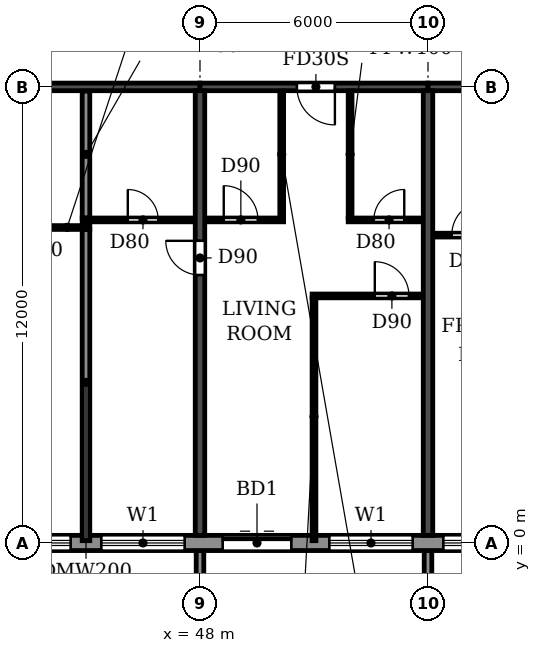
"""IFC4 building model, lengths in metres.
Left out: names, types, materials, properties, quantities, classifications, styles, units other than length and angle.
Written with IfcOpenShell. Run it as: python <this file> out.ifc"""

import sys

from ifc_helpers import new_model, si_unit, direction, frame, frame_2d, origin, place, context, subcontext, project, spatial, polyline, rectangle, outline, extrude, source, transform, mapped, element, fill, save


model = new_model("IFC4")
c1 = context("Model", 3, precision=1e-05, world=origin(), true_north=direction((0.0, 1.0)))
c2 = subcontext(c1, "Body", "Model", "MODEL_VIEW")
j1 = project(units=[si_unit("LENGTHUNIT", "METRE"), si_unit("PLANEANGLEUNIT", "RADIAN")], contexts=[c1])
p1 = place(None, origin())
s1 = spatial("IfcSite", under=j1, at=p1, CompositionType="ELEMENT")
p2 = place(p1, origin())
s2 = spatial("IfcBuilding", under=s1, at=p2, CompositionType="ELEMENT")
p3 = place(p2, frame((0.0, 0.0, 191.7)))
s3 = spatial("IfcBuildingStorey", under=s2, at=p3, CompositionType="ELEMENT", Elevation=191.7)
p4 = place(p3, frame((48.0, 0.2, 0.0), z_axis=(0.0, 0.0, 1.0), x_axis=(0.0, 1.0, 0.0)))
e1 = element("IfcWall", 1, at=p4, inside=s3, PredefinedType="SHEAR", context=c2, shape_type="SweptSolid", body=[
    extrude(rectangle(XDim=11.7, YDim=0.25, at=frame_2d((5.85, 0.0))), origin(), (0.0, 0.0, 1.0), 3.08),
])
p5 = place(p4, frame((6.85, 0.0, 0.0)))
e2 = element("IfcOpeningElement", 2, at=p5, cuts=e1, PredefinedType="OPENING", context=c2, shape_type="SweptSolid", body=[
    extrude(rectangle(XDim=0.9, YDim=2.1, at=frame_2d((0.45, 1.05))), frame((0.0, 0.135, 0.0), z_axis=(0.0, -1.0, 0.0), x_axis=(1.0, 0.0, 0.0)), (0.0, 0.0, 1.0), 0.27),
])
p6 = place(p3, frame((54.0, 0.2, 0.0), z_axis=(0.0, 0.0, 1.0), x_axis=(0.0, 1.0, 0.0)))
e3 = element("IfcWall", 3, at=p6, inside=s3, PredefinedType="SHEAR", context=c2, shape_type="SweptSolid", body=[
    extrude(rectangle(XDim=11.7, YDim=0.25, at=frame_2d((5.85, 0.0))), origin(), (0.0, 0.0, 1.0), 3.08),
])
p7 = place(p3, frame((42.0, 12.0, 0.0), z_axis=(0.0, 0.0, 1.0), x_axis=(1.0, 0.0, 0.0)))
e4 = element("IfcWall", 4, at=p7, inside=s3, PredefinedType="SHEAR", context=c2, shape_type="SweptSolid", body=[
    extrude(rectangle(XDim=6.0, YDim=0.2, at=frame_2d((3.0, 0.0))), origin(), (0.0, 0.0, 1.0), 2.48),
])
p8 = place(p3, frame((48.0, 12.0, 0.0), z_axis=(0.0, 0.0, 1.0), x_axis=(1.0, 0.0, 0.0)))
e5 = element("IfcWall", 5, at=p8, inside=s3, PredefinedType="SHEAR", context=c2, shape_type="SweptSolid", body=[
    extrude(rectangle(XDim=6.0, YDim=0.2, at=frame_2d((3.0, 0.0))), origin(), (0.0, 0.0, 1.0), 2.48),
])
p9 = place(p8, frame((2.55, 0.0, 0.0)))
e6 = element("IfcOpeningElement", 6, at=p9, cuts=e5, PredefinedType="OPENING", context=c2, shape_type="SweptSolid", body=[
    extrude(rectangle(XDim=1.0, YDim=2.1, at=frame_2d((0.5, 1.05))), frame((0.0, 0.11, 0.0), z_axis=(0.0, -1.0, 0.0), x_axis=(1.0, 0.0, 0.0)), (0.0, 0.0, 1.0), 0.22),
])
p10 = place(p3, frame((54.0, 12.0, 0.0), z_axis=(0.0, 0.0, 1.0), x_axis=(1.0, 0.0, 0.0)))
e7 = element("IfcWall", 7, at=p10, inside=s3, PredefinedType="SHEAR", context=c2, shape_type="SweptSolid", body=[
    extrude(rectangle(XDim=6.0, YDim=0.2, at=frame_2d((3.0, 0.0))), origin(), (0.0, 0.0, 1.0), 2.48),
])
p11 = place(p10, frame((2.55, 0.0, 0.0)))
e8 = element("IfcOpeningElement", 8, at=p11, cuts=e7, PredefinedType="OPENING", context=c2, shape_type="SweptSolid", body=[
    extrude(rectangle(XDim=1.0, YDim=2.1, at=frame_2d((0.5, 1.05))), frame((0.0, 0.11, 0.0), z_axis=(0.0, -1.0, 0.0), x_axis=(1.0, 0.0, 0.0)), (0.0, 0.0, 1.0), 0.22),
])
p12 = place(p3, frame((22.683, 0.0, 0.0), z_axis=(0.0, 0.0, 1.0), x_axis=(1.0, 0.0, 0.0)))
e9 = element("IfcWall", 9, at=p12, inside=s3, PredefinedType="STANDARD", context=c2, shape_type="SweptSolid", body=[
    extrude(rectangle(XDim=56.634, YDim=0.4, at=frame_2d((28.317, 0.0))), origin(), (0.0, 0.0, 1.0), 3.08),
])
p13 = place(p12, frame((1.717, 0.0, 0.9)))
e10 = element("IfcOpeningElement", 10, at=p13, cuts=e9, PredefinedType="OPENING", context=c2, shape_type="SweptSolid", body=[
    extrude(rectangle(XDim=2.2, YDim=1.5, at=frame_2d((1.1, 0.75))), frame((0.0, 0.21, 0.0), z_axis=(0.0, -1.0, 0.0), x_axis=(1.0, 0.0, 0.0)), (0.0, 0.0, 1.0), 0.42),
])
p14 = place(p12, frame((4.917, 0.0, 0.0)))
e11 = element("IfcOpeningElement", 11, at=p14, cuts=e9, PredefinedType="OPENING", context=c2, shape_type="SweptSolid", body=[
    extrude(rectangle(XDim=1.8, YDim=2.4, at=frame_2d((0.9, 1.2))), frame((0.0, 0.21, 0.0), z_axis=(0.0, -1.0, 0.0), x_axis=(1.0, 0.0, 0.0)), (0.0, 0.0, 1.0), 0.42),
])
p15 = place(p12, frame((7.717, 0.0, 0.9)))
e12 = element("IfcOpeningElement", 12, at=p15, cuts=e9, PredefinedType="OPENING", context=c2, shape_type="SweptSolid", body=[
    extrude(rectangle(XDim=2.2, YDim=1.5, at=frame_2d((1.1, 0.75))), frame((0.0, 0.21, 0.0), z_axis=(0.0, -1.0, 0.0), x_axis=(1.0, 0.0, 0.0)), (0.0, 0.0, 1.0), 0.42),
])
p16 = place(p12, frame((10.717, 0.0, 0.9)))
e13 = element("IfcOpeningElement", 13, at=p16, cuts=e9, PredefinedType="OPENING", context=c2, shape_type="SweptSolid", body=[
    extrude(rectangle(XDim=2.2, YDim=1.5, at=frame_2d((1.1, 0.75))), frame((0.0, 0.21, 0.0), z_axis=(0.0, -1.0, 0.0), x_axis=(1.0, 0.0, 0.0)), (0.0, 0.0, 1.0), 0.42),
])
p17 = place(p12, frame((13.717, 0.0, 0.9)))
e14 = element("IfcOpeningElement", 14, at=p17, cuts=e9, PredefinedType="OPENING", context=c2, shape_type="SweptSolid", body=[
    extrude(rectangle(XDim=2.2, YDim=1.5, at=frame_2d((1.1, 0.75))), frame((0.0, 0.21, 0.0), z_axis=(0.0, -1.0, 0.0), x_axis=(1.0, 0.0, 0.0)), (0.0, 0.0, 1.0), 0.42),
])
p18 = place(p12, frame((16.917, 0.0, 0.0)))
e15 = element("IfcOpeningElement", 15, at=p18, cuts=e9, PredefinedType="OPENING", context=c2, shape_type="SweptSolid", body=[
    extrude(rectangle(XDim=1.8, YDim=2.4, at=frame_2d((0.9, 1.2))), frame((0.0, 0.21, 0.0), z_axis=(0.0, -1.0, 0.0), x_axis=(1.0, 0.0, 0.0)), (0.0, 0.0, 1.0), 0.42),
])
p19 = place(p12, frame((19.717, 0.0, 0.9)))
e16 = element("IfcOpeningElement", 16, at=p19, cuts=e9, PredefinedType="OPENING", context=c2, shape_type="SweptSolid", body=[
    extrude(rectangle(XDim=2.2, YDim=1.5, at=frame_2d((1.1, 0.75))), frame((0.0, 0.21, 0.0), z_axis=(0.0, -1.0, 0.0), x_axis=(1.0, 0.0, 0.0)), (0.0, 0.0, 1.0), 0.42),
])
p20 = place(p12, frame((22.717, 0.0, 0.9)))
e17 = element("IfcOpeningElement", 17, at=p20, cuts=e9, PredefinedType="OPENING", context=c2, shape_type="SweptSolid", body=[
    extrude(rectangle(XDim=2.2, YDim=1.5, at=frame_2d((1.1, 0.75))), frame((0.0, 0.21, 0.0), z_axis=(0.0, -1.0, 0.0), x_axis=(1.0, 0.0, 0.0)), (0.0, 0.0, 1.0), 0.42),
])
p21 = place(p12, frame((25.917, 0.0, 0.0)))
e18 = element("IfcOpeningElement", 18, at=p21, cuts=e9, PredefinedType="OPENING", context=c2, shape_type="SweptSolid", body=[
    extrude(rectangle(XDim=1.8, YDim=2.4, at=frame_2d((0.9, 1.2))), frame((0.0, 0.21, 0.0), z_axis=(0.0, -1.0, 0.0), x_axis=(1.0, 0.0, 0.0)), (0.0, 0.0, 1.0), 0.42),
])
p22 = place(p12, frame((28.717, 0.0, 0.9)))
e19 = element("IfcOpeningElement", 19, at=p22, cuts=e9, PredefinedType="OPENING", context=c2, shape_type="SweptSolid", body=[
    extrude(rectangle(XDim=2.2, YDim=1.5, at=frame_2d((1.1, 0.75))), frame((0.0, 0.21, 0.0), z_axis=(0.0, -1.0, 0.0), x_axis=(1.0, 0.0, 0.0)), (0.0, 0.0, 1.0), 0.42),
])
p23 = place(p12, frame((31.717, 0.0, 0.9)))
e20 = element("IfcOpeningElement", 20, at=p23, cuts=e9, PredefinedType="OPENING", context=c2, shape_type="SweptSolid", body=[
    extrude(rectangle(XDim=2.2, YDim=1.5, at=frame_2d((1.1, 0.75))), frame((0.0, 0.21, 0.0), z_axis=(0.0, -1.0, 0.0), x_axis=(1.0, 0.0, 0.0)), (0.0, 0.0, 1.0), 0.42),
])
p24 = place(p12, frame((34.717, 0.0, 0.9)))
e21 = element("IfcOpeningElement", 21, at=p24, cuts=e9, PredefinedType="OPENING", context=c2, shape_type="SweptSolid", body=[
    extrude(rectangle(XDim=2.2, YDim=1.5, at=frame_2d((1.1, 0.75))), frame((0.0, 0.21, 0.0), z_axis=(0.0, -1.0, 0.0), x_axis=(1.0, 0.0, 0.0)), (0.0, 0.0, 1.0), 0.42),
])
p25 = place(p12, frame((37.717, 0.0, 0.9)))
e22 = element("IfcOpeningElement", 22, at=p25, cuts=e9, PredefinedType="OPENING", context=c2, shape_type="SweptSolid", body=[
    extrude(rectangle(XDim=2.2, YDim=1.5, at=frame_2d((1.1, 0.75))), frame((0.0, 0.21, 0.0), z_axis=(0.0, -1.0, 0.0), x_axis=(1.0, 0.0, 0.0)), (0.0, 0.0, 1.0), 0.42),
])
p26 = place(p12, frame((40.917, 0.0, 0.0)))
e23 = element("IfcOpeningElement", 23, at=p26, cuts=e9, PredefinedType="OPENING", context=c2, shape_type="SweptSolid", body=[
    extrude(rectangle(XDim=1.8, YDim=2.4, at=frame_2d((0.9, 1.2))), frame((0.0, 0.21, 0.0), z_axis=(0.0, -1.0, 0.0), x_axis=(1.0, 0.0, 0.0)), (0.0, 0.0, 1.0), 0.42),
])
p27 = place(p12, frame((43.717, 0.0, 0.9)))
e24 = element("IfcOpeningElement", 24, at=p27, cuts=e9, PredefinedType="OPENING", context=c2, shape_type="SweptSolid", body=[
    extrude(rectangle(XDim=2.2, YDim=1.5, at=frame_2d((1.1, 0.75))), frame((0.0, 0.21, 0.0), z_axis=(0.0, -1.0, 0.0), x_axis=(1.0, 0.0, 0.0)), (0.0, 0.0, 1.0), 0.42),
])
p28 = place(p12, frame((46.717, 0.0, 0.9)))
e25 = element("IfcOpeningElement", 25, at=p28, cuts=e9, PredefinedType="OPENING", context=c2, shape_type="SweptSolid", body=[
    extrude(rectangle(XDim=2.2, YDim=1.5, at=frame_2d((1.1, 0.75))), frame((0.0, 0.21, 0.0), z_axis=(0.0, -1.0, 0.0), x_axis=(1.0, 0.0, 0.0)), (0.0, 0.0, 1.0), 0.42),
])
p29 = place(p12, frame((49.917, 0.0, 0.0)))
e26 = element("IfcOpeningElement", 26, at=p29, cuts=e9, PredefinedType="OPENING", context=c2, shape_type="SweptSolid", body=[
    extrude(rectangle(XDim=1.8, YDim=2.4, at=frame_2d((0.9, 1.2))), frame((0.0, 0.21, 0.0), z_axis=(0.0, -1.0, 0.0), x_axis=(1.0, 0.0, 0.0)), (0.0, 0.0, 1.0), 0.42),
])
p30 = place(p12, frame((52.717, 0.0, 0.9)))
e27 = element("IfcOpeningElement", 27, at=p30, cuts=e9, PredefinedType="OPENING", context=c2, shape_type="SweptSolid", body=[
    extrude(rectangle(XDim=2.2, YDim=1.5, at=frame_2d((1.1, 0.75))), frame((0.0, 0.21, 0.0), z_axis=(0.0, -1.0, 0.0), x_axis=(1.0, 0.0, 0.0)), (0.0, 0.0, 1.0), 0.42),
])
m1 = source(origin(), c2, "Body", "SweptSolid", [
    extrude(outline(polyline([(0.0, 0.0), (0.2, 0.0), (0.2, 1.65), (0.0, 1.65), (0.0, 0.0)])), origin(), (0.0, 0.0, 1.0), 3.1),
])
for number, where in (
    (28, (47.9, -1.85, 0.0)),
    (29, (53.9, -1.85, 0.0)),
):
    element("IfcWall", number, at=place(p3, frame(where)), inside=s3, PredefinedType="STANDARD", context=c2, shape_type="MappedRepresentation", body=[
        mapped(m1, transform((0.0, 0.0, 0.0))),
    ])
p31 = place(p3, frame((45.0, 0.06, 0.0), z_axis=(0.0, 0.0, 1.0), x_axis=(0.0, 1.0, 0.0)))
e30 = element("IfcWall", 30, at=p31, inside=s3, PredefinedType="PARTITIONING", context=c2, shape_type="SweptSolid", body=[
    extrude(rectangle(XDim=8.19, YDim=0.2, at=frame_2d((4.095, 0.0))), origin(), (0.0, 0.0, 1.0), 3.08),
])
p32 = place(p3, frame((45.0, 8.55, 0.0), z_axis=(0.0, 0.0, 1.0), x_axis=(0.0, 1.0, 0.0)))
e31 = element("IfcWall", 31, at=p32, inside=s3, PredefinedType="PARTITIONING", context=c2, shape_type="SweptSolid", body=[
    extrude(rectangle(XDim=3.34, YDim=0.2, at=frame_2d((1.67, 0.0))), origin(), (0.0, 0.0, 1.0), 3.08),
])
p33 = place(p3, frame((50.95, 6.5, 0.0), z_axis=(0.0, 0.0, 1.0), x_axis=(1.0, 0.0, 0.0)))
e32 = element("IfcWall", 32, at=p33, inside=s3, PredefinedType="PARTITIONING", context=c2, shape_type="SweptSolid", body=[
    extrude(rectangle(XDim=2.915, YDim=0.1, at=frame_2d((1.458, 0.0))), origin(), (0.0, 0.0, 1.0), 3.08),
])
p34 = place(p33, frame((1.65, 0.0, 0.0)))
e33 = element("IfcOpeningElement", 33, at=p34, cuts=e32, PredefinedType="OPENING", context=c2, shape_type="SweptSolid", body=[
    extrude(rectangle(XDim=0.9, YDim=2.1, at=frame_2d((0.45, 1.05))), frame((0.0, 0.06, 0.0), z_axis=(0.0, -1.0, 0.0), x_axis=(1.0, 0.0, 0.0)), (0.0, 0.0, 1.0), 0.12),
])
p35 = place(p3, frame((54.135, 8.1, 0.0), z_axis=(0.0, 0.0, 1.0), x_axis=(1.0, 0.0, 0.0)))
e34 = element("IfcWall", 34, at=p35, inside=s3, PredefinedType="PARTITIONING", context=c2, shape_type="SweptSolid", body=[
    extrude(rectangle(XDim=2.065, YDim=0.1, at=frame_2d((1.032, 0.0))), origin(), (0.0, 0.0, 1.0), 3.08),
])
p36 = place(p35, frame((0.49, 0.0, 0.0)))
e35 = element("IfcOpeningElement", 35, at=p36, cuts=e34, PredefinedType="OPENING", context=c2, shape_type="SweptSolid", body=[
    extrude(rectangle(XDim=0.9, YDim=2.1, at=frame_2d((0.45, 1.05))), frame((0.0, 0.06, 0.0), z_axis=(0.0, -1.0, 0.0), x_axis=(1.0, 0.0, 0.0)), (0.0, 0.0, 1.0), 0.12),
])
p37 = place(p3, frame((42.135, 8.3, 0.0), z_axis=(0.0, 0.0, 1.0), x_axis=(1.0, 0.0, 0.0)))
e36 = element("IfcWall", 36, at=p37, inside=s3, PredefinedType="PARTITIONING", context=c2, shape_type="SweptSolid", body=[
    extrude(rectangle(XDim=2.965, YDim=0.1, at=frame_2d((1.482, 0.0))), origin(), (0.0, 0.0, 1.0), 3.08),
])
p38 = place(p37, frame((0.965, 0.0, 0.0)))
e37 = element("IfcOpeningElement", 37, at=p38, cuts=e36, PredefinedType="OPENING", context=c2, shape_type="SweptSolid", body=[
    extrude(rectangle(XDim=0.8, YDim=2.1, at=frame_2d((0.4, 1.05))), frame((0.0, 0.06, 0.0), z_axis=(0.0, -1.0, 0.0), x_axis=(1.0, 0.0, 0.0)), (0.0, 0.0, 1.0), 0.12),
])
p39 = place(p3, frame((44.9, 8.5, 0.0), z_axis=(0.0, 0.0, 1.0), x_axis=(1.0, 0.0, 0.0)))
e38 = element("IfcWall", 38, at=p39, inside=s3, PredefinedType="PARTITIONING", context=c2, shape_type="SweptSolid", body=[
    extrude(rectangle(XDim=2.965, YDim=0.1, at=frame_2d((1.482, 0.0))), origin(), (0.0, 0.0, 1.0), 3.08),
])
p40 = place(p39, frame((1.2, 0.0, 0.0)))
e39 = element("IfcOpeningElement", 39, at=p40, cuts=e38, PredefinedType="OPENING", context=c2, shape_type="SweptSolid", body=[
    extrude(rectangle(XDim=0.8, YDim=2.1, at=frame_2d((0.4, 1.05))), frame((0.0, 0.06, 0.0), z_axis=(0.0, -1.0, 0.0), x_axis=(1.0, 0.0, 0.0)), (0.0, 0.0, 1.0), 0.12),
])
p41 = place(p3, frame((48.135, 8.5, 0.0), z_axis=(0.0, 0.0, 1.0), x_axis=(1.0, 0.0, 0.0)))
e40 = element("IfcWall", 40, at=p41, inside=s3, PredefinedType="PARTITIONING", context=c2, shape_type="SweptSolid", body=[
    extrude(rectangle(XDim=2.065, YDim=0.1, at=frame_2d((1.032, 0.0))), origin(), (0.0, 0.0, 1.0), 3.08),
])
p42 = place(p41, frame((0.49, 0.0, 0.0)))
e41 = element("IfcOpeningElement", 41, at=p42, cuts=e40, PredefinedType="OPENING", context=c2, shape_type="SweptSolid", body=[
    extrude(rectangle(XDim=0.9, YDim=2.1, at=frame_2d((0.45, 1.05))), frame((0.0, 0.06, 0.0), z_axis=(0.0, -1.0, 0.0), x_axis=(1.0, 0.0, 0.0)), (0.0, 0.0, 1.0), 0.12),
])
p43 = place(p3, frame((51.9, 8.5, 0.0), z_axis=(0.0, 0.0, 1.0), x_axis=(1.0, 0.0, 0.0)))
e42 = element("IfcWall", 42, at=p43, inside=s3, PredefinedType="PARTITIONING", context=c2, shape_type="SweptSolid", body=[
    extrude(rectangle(XDim=1.965, YDim=0.1, at=frame_2d((0.982, 0.0))), origin(), (0.0, 0.0, 1.0), 3.08),
])
p44 = place(p43, frame((0.675, 0.0, 0.0)))
e43 = element("IfcOpeningElement", 43, at=p44, cuts=e42, PredefinedType="OPENING", context=c2, shape_type="SweptSolid", body=[
    extrude(rectangle(XDim=0.8, YDim=2.1, at=frame_2d((0.4, 1.05))), frame((0.0, 0.06, 0.0), z_axis=(0.0, -1.0, 0.0), x_axis=(1.0, 0.0, 0.0)), (0.0, 0.0, 1.0), 0.12),
])
p45 = place(p3, frame((50.15, 8.55, 0.0), z_axis=(0.0, 0.0, 1.0), x_axis=(0.0, 1.0, 0.0)))
e44 = element("IfcWall", 44, at=p45, inside=s3, PredefinedType="PARTITIONING", context=c2, shape_type="SweptSolid", body=[
    extrude(rectangle(XDim=3.34, YDim=0.1, at=frame_2d((1.67, 0.0))), origin(), (0.0, 0.0, 1.0), 3.08),
])
p46 = place(p3, frame((51.0, 0.06, 0.0), z_axis=(0.0, 0.0, 1.0), x_axis=(0.0, 1.0, 0.0)))
e45 = element("IfcWall", 45, at=p46, inside=s3, PredefinedType="PARTITIONING", context=c2, shape_type="SweptSolid", body=[
    extrude(rectangle(XDim=6.39, YDim=0.1, at=frame_2d((3.195, 0.0))), origin(), (0.0, 0.0, 1.0), 3.08),
])
p47 = place(p3, frame((51.95, 8.55, 0.0), z_axis=(0.0, 0.0, 1.0), x_axis=(0.0, 1.0, 0.0)))
e46 = element("IfcWall", 46, at=p47, inside=s3, PredefinedType="PARTITIONING", context=c2, shape_type="SweptSolid", body=[
    extrude(rectangle(XDim=3.34, YDim=0.1, at=frame_2d((1.67, 0.0))), origin(), (0.0, 0.0, 1.0), 3.08),
])
p48 = place(p19, origin())
e47 = element("IfcWindow", 47, at=p48, inside=s3, PartitioningType="DOUBLE_PANEL_HORIZONTAL", PredefinedType="WINDOW", context=c2, shape_type="SweptSolid", body=[
    extrude(rectangle(XDim=2.2, YDim=1.5, at=frame_2d((1.1, 0.75))), frame((0.0, 0.03, 0.0), z_axis=(0.0, -1.0, 0.0), x_axis=(1.0, 0.0, 0.0)), (0.0, 0.0, 1.0), 0.06),
])
fill(e16, e47)
p49 = place(p20, origin())
e48 = element("IfcWindow", 48, at=p49, inside=s3, PartitioningType="DOUBLE_PANEL_HORIZONTAL", PredefinedType="WINDOW", context=c2, shape_type="SweptSolid", body=[
    extrude(rectangle(XDim=2.2, YDim=1.5, at=frame_2d((1.1, 0.75))), frame((0.0, 0.03, 0.0), z_axis=(0.0, -1.0, 0.0), x_axis=(1.0, 0.0, 0.0)), (0.0, 0.0, 1.0), 0.06),
])
fill(e17, e48)
p50 = place(p21, origin())
e49 = element("IfcDoor", 49, at=p50, inside=s3, OperationType="DOUBLE_DOOR_SLIDING", PredefinedType="DOOR", context=c2, shape_type="SweptSolid", body=[
    extrude(rectangle(XDim=1.8, YDim=2.4, at=frame_2d((0.9, 1.2))), frame((0.0, 0.025, 0.0), z_axis=(0.0, -1.0, 0.0), x_axis=(1.0, 0.0, 0.0)), (0.0, 0.0, 1.0), 0.05),
])
fill(e18, e49)
p51 = place(p22, origin())
e50 = element("IfcWindow", 50, at=p51, inside=s3, PartitioningType="DOUBLE_PANEL_HORIZONTAL", PredefinedType="WINDOW", context=c2, shape_type="SweptSolid", body=[
    extrude(rectangle(XDim=2.2, YDim=1.5, at=frame_2d((1.1, 0.75))), frame((0.0, 0.03, 0.0), z_axis=(0.0, -1.0, 0.0), x_axis=(1.0, 0.0, 0.0)), (0.0, 0.0, 1.0), 0.06),
])
fill(e19, e50)
p52 = place(p23, origin())
e51 = element("IfcWindow", 51, at=p52, inside=s3, PartitioningType="DOUBLE_PANEL_HORIZONTAL", PredefinedType="WINDOW", context=c2, shape_type="SweptSolid", body=[
    extrude(rectangle(XDim=2.2, YDim=1.5, at=frame_2d((1.1, 0.75))), frame((0.0, 0.03, 0.0), z_axis=(0.0, -1.0, 0.0), x_axis=(1.0, 0.0, 0.0)), (0.0, 0.0, 1.0), 0.06),
])
fill(e20, e51)
p53 = place(p40, origin())
e52 = element("IfcDoor", 52, at=p53, inside=s3, OperationType="SINGLE_SWING_LEFT", PredefinedType="DOOR", context=c2, shape_type="SweptSolid", body=[
    extrude(rectangle(XDim=0.8, YDim=2.1, at=frame_2d((0.4, 1.05))), frame((0.0, 0.025, 0.0), z_axis=(0.0, -1.0, 0.0), x_axis=(1.0, 0.0, 0.0)), (0.0, 0.0, 1.0), 0.05),
])
fill(e39, e52)
p54 = place(p5, origin())
e53 = element("IfcDoor", 53, at=p54, inside=s3, OperationType="SINGLE_SWING_RIGHT", PredefinedType="DOOR", context=c2, shape_type="SweptSolid", body=[
    extrude(rectangle(XDim=0.9, YDim=2.1, at=frame_2d((0.45, 1.05))), frame((0.0, 0.025, 0.0), z_axis=(0.0, -1.0, 0.0), x_axis=(1.0, 0.0, 0.0)), (0.0, 0.0, 1.0), 0.05),
])
fill(e2, e53)
p55 = place(p42, origin())
e54 = element("IfcDoor", 54, at=p55, inside=s3, OperationType="SINGLE_SWING_LEFT", PredefinedType="DOOR", context=c2, shape_type="SweptSolid", body=[
    extrude(rectangle(XDim=0.9, YDim=2.1, at=frame_2d((0.45, 1.05))), frame((0.0, 0.025, 0.0), z_axis=(0.0, -1.0, 0.0), x_axis=(1.0, 0.0, 0.0)), (0.0, 0.0, 1.0), 0.05),
])
fill(e41, e54)
p56 = place(p9, frame((1.0, 0.0, 0.0), z_axis=(0.0, 0.0, 1.0), x_axis=(-1.0, 0.0, 0.0)))
e55 = element("IfcDoor", 55, at=p56, inside=s3, OperationType="SINGLE_SWING_LEFT", PredefinedType="DOOR", context=c2, shape_type="SweptSolid", body=[
    extrude(rectangle(XDim=1.0, YDim=2.1, at=frame_2d((0.5, 1.05))), frame((0.0, 0.025, 0.0), z_axis=(0.0, -1.0, 0.0), x_axis=(1.0, 0.0, 0.0)), (0.0, 0.0, 1.0), 0.05),
])
fill(e6, e55)
p57 = place(p44, origin())
e56 = element("IfcDoor", 56, at=p57, inside=s3, OperationType="SINGLE_SWING_RIGHT", PredefinedType="DOOR", context=c2, shape_type="SweptSolid", body=[
    extrude(rectangle(XDim=0.8, YDim=2.1, at=frame_2d((0.4, 1.05))), frame((0.0, 0.025, 0.0), z_axis=(0.0, -1.0, 0.0), x_axis=(1.0, 0.0, 0.0)), (0.0, 0.0, 1.0), 0.05),
])
fill(e43, e56)
p58 = place(p34, origin())
e57 = element("IfcDoor", 57, at=p58, inside=s3, OperationType="SINGLE_SWING_LEFT", PredefinedType="DOOR", context=c2, shape_type="SweptSolid", body=[
    extrude(rectangle(XDim=0.9, YDim=2.1, at=frame_2d((0.45, 1.05))), frame((0.0, 0.025, 0.0), z_axis=(0.0, -1.0, 0.0), x_axis=(1.0, 0.0, 0.0)), (0.0, 0.0, 1.0), 0.05),
])
fill(e33, e57)
p59 = place(p36, origin())
e58 = element("IfcDoor", 58, at=p59, inside=s3, OperationType="SINGLE_SWING_RIGHT", PredefinedType="DOOR", context=c2, shape_type="SweptSolid", body=[
    extrude(rectangle(XDim=0.9, YDim=2.1, at=frame_2d((0.45, 1.05))), frame((0.0, 0.025, 0.0), z_axis=(0.0, -1.0, 0.0), x_axis=(1.0, 0.0, 0.0)), (0.0, 0.0, 1.0), 0.05),
])
fill(e35, e58)
save(model, sys.argv[1])
